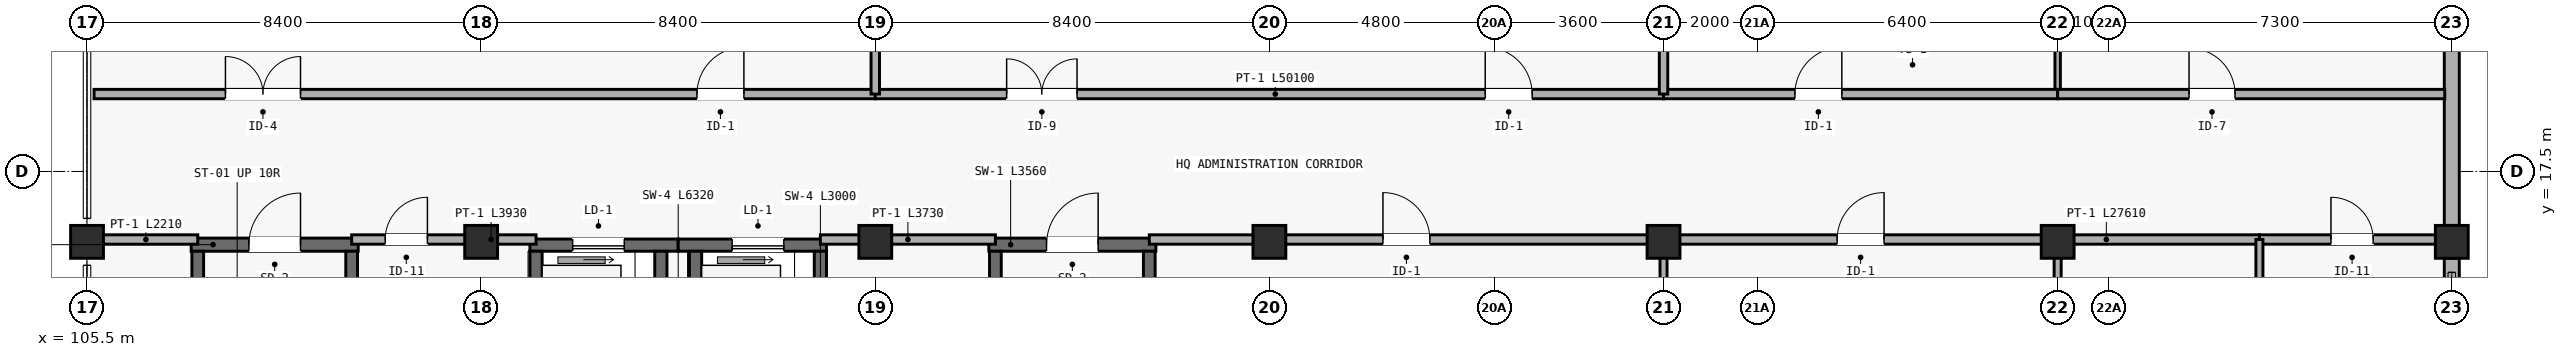
"""IFC4 building model, lengths in metres.
Left out: names, types, materials, properties, quantities, classifications, styles, units other than length and angle.
Written with IfcOpenShell. Run it as: python <this file> out.ifc"""

import sys

from ifc_helpers import new_model, si_unit, direction, frame, frame_2d, origin, origin_2d, place, context, subcontext, project, spatial, rectangle, extrude, element, fill, save


model = new_model("IFC4")
c1 = context("Model", 3, precision=1e-05, world=origin(), true_north=direction((0.0, 1.0)))
c2 = subcontext(c1, "Body", "Model", "MODEL_VIEW")
j1 = project(units=[si_unit("LENGTHUNIT", "METRE"), si_unit("PLANEANGLEUNIT", "RADIAN")], contexts=[c1])
p1 = place(None, origin())
s1 = spatial("IfcSite", under=j1, at=p1, CompositionType="ELEMENT")
p2 = place(p1, origin())
s2 = spatial("IfcBuilding", under=s1, at=p2, CompositionType="ELEMENT")
p3 = place(p2, frame((0.0, 0.0, 5.85)))
s3 = spatial("IfcBuildingStorey", under=s2, at=p3, CompositionType="ELEMENT", Elevation=5.85)
for number, where, z_axis, x_axis in (
    (1, (105.5, 16.0, 0.0), (0.0, 0.0, 1.0), (1.0, 0.0, 0.0)),
    (2, (113.9, 16.0, 0.0), (0.0, 0.0, 1.0), (1.0, 0.0, 0.0)),
    (3, (122.3, 16.0, 0.0), (0.0, 0.0, 1.0), (1.0, 0.0, 0.0)),
    (4, (130.7, 16.0, 0.0), (0.0, 0.0, 1.0), (1.0, 0.0, 0.0)),
    (5, (139.1, 16.0, 0.0), (0.0, 0.0, 1.0), (1.0, 0.0, 0.0)),
    (6, (147.5, 16.0, 0.0), (0.0, 0.0, 1.0), (1.0, 0.0, 0.0)),
    (7, (155.9, 16.0, 0.0), (0.0, 0.0, 1.0), (1.0, 0.0, 0.0)),
):
    element("IfcColumn", number, at=place(p3, frame(where, z_axis=z_axis, x_axis=x_axis)), inside=s3, PredefinedType="COLUMN", context=c2, shape_type="SweptSolid", body=[
        extrude(rectangle(XDim=0.7, YDim=0.7, at=origin_2d()), origin(), (0.0, 0.0, 1.0), 3.45),
    ])
p4 = place(p3, frame((155.9, 9.35, 0.0), z_axis=(0.0, 0.0, 1.0), x_axis=(0.0, 1.0, 0.0)))
e8 = element("IfcWall", 8, at=p4, inside=s3, PredefinedType="STANDARD", context=c2, shape_type="SweptSolid", body=[
    extrude(rectangle(XDim=6.3, YDim=0.32, at=frame_2d((3.15, 0.0))), origin(), (0.0, 0.0, 1.0), 2.7),
])
p5 = place(p3, frame((155.9, 16.35, 0.0), z_axis=(0.0, 0.0, 1.0), x_axis=(0.0, 1.0, 0.0)))
e9 = element("IfcWall", 9, at=p5, inside=s3, PredefinedType="STANDARD", context=c2, shape_type="SweptSolid", body=[
    extrude(rectangle(XDim=7.8, YDim=0.32, at=frame_2d((3.9, 0.0))), origin(), (0.0, 0.0, 1.0), 2.7),
])
p6 = place(p5, frame((3.9, 0.0, 0.75)))
e10 = element("IfcOpeningElement", 10, at=p6, cuts=e9, PredefinedType="OPENING", context=c2, shape_type="SweptSolid", body=[
    extrude(rectangle(XDim=1.75, YDim=1.55, at=frame_2d((0.875, 0.775))), frame((0.0, 0.17, 0.0), z_axis=(0.0, -1.0, 0.0), x_axis=(1.0, 0.0, 0.0)), (0.0, 0.0, 1.0), 0.34),
])
p7 = place(p3, frame((107.72, 15.94, 0.0), z_axis=(0.0, 0.0, 1.0), x_axis=(1.0, 0.0, 0.0)))
e11 = element("IfcWall", 11, at=p7, inside=s3, PredefinedType="SHEAR", context=c2, shape_type="SweptSolid", body=[
    extrude(rectangle(XDim=3.56, YDim=0.28, at=frame_2d((1.78, 0.0))), origin(), (0.0, 0.0, 1.0), 3.2),
])
p8 = place(p7, frame((1.23, 0.0, 0.0)))
e12 = element("IfcOpeningElement", 12, at=p8, cuts=e11, PredefinedType="OPENING", context=c2, shape_type="SweptSolid", body=[
    extrude(rectangle(XDim=1.1, YDim=2.15, at=frame_2d((0.55, 1.075))), frame((0.0, 0.15, 0.0), z_axis=(0.0, -1.0, 0.0), x_axis=(1.0, 0.0, 0.0)), (0.0, 0.0, 1.0), 0.3),
])
for number, where, z_axis, x_axis in (
    (13, (107.86, 15.8, 0.0), (0.0, 0.0, 1.0), (0.0, -1.0, 0.0)),
    (14, (111.14, 9.5, 0.0), (0.0, 0.0, 1.0), (0.0, 1.0, 0.0)),
):
    element("IfcWall", number, at=place(p3, frame(where, z_axis=z_axis, x_axis=x_axis)), inside=s3, PredefinedType="SHEAR", context=c2, shape_type="SweptSolid", body=[
        extrude(rectangle(XDim=6.3, YDim=0.25, at=frame_2d((3.15, 0.0))), origin(), (0.0, 0.0, 1.0), 3.2),
    ])
p9 = place(p3, frame((124.72, 15.94, 0.0), z_axis=(0.0, 0.0, 1.0), x_axis=(1.0, 0.0, 0.0)))
e15 = element("IfcWall", 15, at=p9, inside=s3, PredefinedType="SHEAR", context=c2, shape_type="SweptSolid", body=[
    extrude(rectangle(XDim=3.56, YDim=0.28, at=frame_2d((1.78, 0.0))), origin(), (0.0, 0.0, 1.0), 3.2),
])
p10 = place(p9, frame((1.23, 0.0, 0.0)))
e16 = element("IfcOpeningElement", 16, at=p10, cuts=e15, PredefinedType="OPENING", context=c2, shape_type="SweptSolid", body=[
    extrude(rectangle(XDim=1.1, YDim=2.15, at=frame_2d((0.55, 1.075))), frame((0.0, 0.15, 0.0), z_axis=(0.0, -1.0, 0.0), x_axis=(1.0, 0.0, 0.0)), (0.0, 0.0, 1.0), 0.3),
])
for number, where, z_axis, x_axis in (
    (17, (124.86, 15.8, 0.0), (0.0, 0.0, 1.0), (0.0, -1.0, 0.0)),
    (18, (128.14, 9.5, 0.0), (0.0, 0.0, 1.0), (0.0, 1.0, 0.0)),
):
    element("IfcWall", number, at=place(p3, frame(where, z_axis=z_axis, x_axis=x_axis)), inside=s3, PredefinedType="SHEAR", context=c2, shape_type="SweptSolid", body=[
        extrude(rectangle(XDim=6.3, YDim=0.25, at=frame_2d((3.15, 0.0))), origin(), (0.0, 0.0, 1.0), 3.2),
    ])
p11 = place(p3, frame((118.1, 15.93, 0.0), z_axis=(0.0, 0.0, 1.0), x_axis=(-1.0, 0.0, 0.0)))
e19 = element("IfcWall", 19, at=p11, inside=s3, PredefinedType="SHEAR", context=c2, shape_type="SweptSolid", body=[
    extrude(rectangle(XDim=3.16, YDim=0.26, at=frame_2d((1.58, 0.0))), origin(), (0.0, 0.0, 1.0), 3.2),
])
p12 = place(p11, frame((1.15, 0.0, 0.0)))
e20 = element("IfcOpeningElement", 20, at=p12, cuts=e19, PredefinedType="OPENING", context=c2, shape_type="SweptSolid", body=[
    extrude(rectangle(XDim=1.1, YDim=2.15, at=frame_2d((0.55, 1.075))), frame((0.0, 0.14, 0.0), z_axis=(0.0, -1.0, 0.0), x_axis=(1.0, 0.0, 0.0)), (0.0, 0.0, 1.0), 0.28),
])
for number, where, z_axis, x_axis in (
    (21, (115.07, 15.8, 0.0), (0.0, 0.0, 1.0), (0.0, -1.0, 0.0)),
    (22, (117.73, 12.8, 0.0), (0.0, 0.0, 1.0), (0.0, 1.0, 0.0)),
):
    element("IfcWall", number, at=place(p3, frame(where, z_axis=z_axis, x_axis=x_axis)), inside=s3, PredefinedType="SHEAR", context=c2, shape_type="SweptSolid", body=[
        extrude(rectangle(XDim=3.0, YDim=0.26, at=frame_2d((1.5, 0.0))), origin(), (0.0, 0.0, 1.0), 3.2),
    ])
p13 = place(p3, frame((121.26, 15.93, 0.0), z_axis=(0.0, 0.0, 1.0), x_axis=(-1.0, 0.0, 0.0)))
e23 = element("IfcWall", 23, at=p13, inside=s3, PredefinedType="SHEAR", context=c2, shape_type="SweptSolid", body=[
    extrude(rectangle(XDim=3.16, YDim=0.26, at=frame_2d((1.58, 0.0))), origin(), (0.0, 0.0, 1.0), 3.2),
])
p14 = place(p13, frame((0.91, 0.0, 0.0)))
e24 = element("IfcOpeningElement", 24, at=p14, cuts=e23, PredefinedType="OPENING", context=c2, shape_type="SweptSolid", body=[
    extrude(rectangle(XDim=1.1, YDim=2.15, at=frame_2d((0.55, 1.075))), frame((0.0, 0.14, 0.0), z_axis=(0.0, -1.0, 0.0), x_axis=(1.0, 0.0, 0.0)), (0.0, 0.0, 1.0), 0.28),
])
for number, where, z_axis, x_axis in (
    (25, (118.47, 15.8, 0.0), (0.0, 0.0, 1.0), (0.0, -1.0, 0.0)),
    (26, (121.13, 12.8, 0.0), (0.0, 0.0, 1.0), (0.0, 1.0, 0.0)),
):
    element("IfcWall", number, at=place(p3, frame(where, z_axis=z_axis, x_axis=x_axis)), inside=s3, PredefinedType="SHEAR", context=c2, shape_type="SweptSolid", body=[
        extrude(rectangle(XDim=3.0, YDim=0.26, at=frame_2d((1.5, 0.0))), origin(), (0.0, 0.0, 1.0), 3.2),
    ])
p15 = place(p3, frame((105.65, 16.05, 0.0), z_axis=(0.0, 0.0, 1.0), x_axis=(1.0, 0.0, 0.0)))
e27 = element("IfcWall", 27, at=p15, inside=s3, PredefinedType="PARTITIONING", context=c2, shape_type="SweptSolid", body=[
    extrude(rectangle(XDim=2.21, YDim=0.2, at=frame_2d((1.105, 0.0))), origin(), (0.0, 0.0, 1.0), 2.65),
])
p16 = place(p3, frame((111.14, 16.05, 0.0), z_axis=(0.0, 0.0, 1.0), x_axis=(1.0, 0.0, 0.0)))
e28 = element("IfcWall", 28, at=p16, inside=s3, PredefinedType="PARTITIONING", context=c2, shape_type="SweptSolid", body=[
    extrude(rectangle(XDim=3.93, YDim=0.2, at=frame_2d((1.965, 0.0))), origin(), (0.0, 0.0, 1.0), 2.65),
])
p17 = place(p16, frame((0.715, 0.0, 0.0)))
e29 = element("IfcOpeningElement", 29, at=p17, cuts=e28, PredefinedType="OPENING", context=c2, shape_type="SweptSolid", body=[
    extrude(rectangle(XDim=0.9, YDim=2.08, at=frame_2d((0.45, 1.04))), frame((0.0, 0.11, 0.0), z_axis=(0.0, -1.0, 0.0), x_axis=(1.0, 0.0, 0.0)), (0.0, 0.0, 1.0), 0.22),
])
p18 = place(p3, frame((121.13, 16.05, 0.0), z_axis=(0.0, 0.0, 1.0), x_axis=(1.0, 0.0, 0.0)))
e30 = element("IfcWall", 30, at=p18, inside=s3, PredefinedType="PARTITIONING", context=c2, shape_type="SweptSolid", body=[
    extrude(rectangle(XDim=3.73, YDim=0.2, at=frame_2d((1.865, 0.0))), origin(), (0.0, 0.0, 1.0), 2.65),
])
p19 = place(p3, frame((128.14, 16.05, 0.0), z_axis=(0.0, 0.0, 1.0), x_axis=(1.0, 0.0, 0.0)))
e31 = element("IfcWall", 31, at=p19, inside=s3, PredefinedType="PARTITIONING", context=c2, shape_type="SweptSolid", body=[
    extrude(rectangle(XDim=10.96, YDim=0.2, at=frame_2d((5.48, 0.0))), origin(), (0.0, 0.0, 1.0), 2.65),
])
p20 = place(p19, frame((4.98, 0.0, 0.0)))
e32 = element("IfcOpeningElement", 32, at=p20, cuts=e31, PredefinedType="OPENING", context=c2, shape_type="SweptSolid", body=[
    extrude(rectangle(XDim=1.0, YDim=2.12, at=frame_2d((0.5, 1.06))), frame((0.0, 0.11, 0.0), z_axis=(0.0, -1.0, 0.0), x_axis=(1.0, 0.0, 0.0)), (0.0, 0.0, 1.0), 0.22),
])
p21 = place(p3, frame((139.1, 16.05, 0.0), z_axis=(0.0, 0.0, 1.0), x_axis=(1.0, 0.0, 0.0)))
e33 = element("IfcWall", 33, at=p21, inside=s3, PredefinedType="PARTITIONING", context=c2, shape_type="SweptSolid", body=[
    extrude(rectangle(XDim=8.4, YDim=0.2, at=frame_2d((4.2, 0.0))), origin(), (0.0, 0.0, 1.0), 2.65),
])
p22 = place(p21, frame((3.7, 0.0, 0.0)))
e34 = element("IfcOpeningElement", 34, at=p22, cuts=e33, PredefinedType="OPENING", context=c2, shape_type="SweptSolid", body=[
    extrude(rectangle(XDim=1.0, YDim=2.12, at=frame_2d((0.5, 1.06))), frame((0.0, 0.11, 0.0), z_axis=(0.0, -1.0, 0.0), x_axis=(1.0, 0.0, 0.0)), (0.0, 0.0, 1.0), 0.22),
])
p23 = place(p3, frame((147.5, 16.05, 0.0), z_axis=(0.0, 0.0, 1.0), x_axis=(1.0, 0.0, 0.0)))
e35 = element("IfcWall", 35, at=p23, inside=s3, PredefinedType="PARTITIONING", context=c2, shape_type="SweptSolid", body=[
    extrude(rectangle(XDim=4.3, YDim=0.2, at=frame_2d((2.15, 0.0))), origin(), (0.0, 0.0, 1.0), 2.65),
])
p24 = place(p3, frame((151.8, 16.05, 0.0), z_axis=(0.0, 0.0, 1.0), x_axis=(1.0, 0.0, 0.0)))
e36 = element("IfcWall", 36, at=p24, inside=s3, PredefinedType="PARTITIONING", context=c2, shape_type="SweptSolid", body=[
    extrude(rectangle(XDim=3.95, YDim=0.2, at=frame_2d((1.975, 0.0))), origin(), (0.0, 0.0, 1.0), 2.65),
])
p25 = place(p24, frame((1.525, 0.0, 0.0)))
e37 = element("IfcOpeningElement", 37, at=p25, cuts=e36, PredefinedType="OPENING", context=c2, shape_type="SweptSolid", body=[
    extrude(rectangle(XDim=0.9, YDim=2.08, at=frame_2d((0.45, 1.04))), frame((0.0, 0.11, 0.0), z_axis=(0.0, -1.0, 0.0), x_axis=(1.0, 0.0, 0.0)), (0.0, 0.0, 1.0), 0.22),
])
for number, where, z_axis, x_axis in (
    (38, (139.1, 9.15, 0.0), (0.0, 0.0, 1.0), (0.0, 1.0, 0.0)),
    (39, (147.5, 9.15, 0.0), (0.0, 0.0, 1.0), (0.0, 1.0, 0.0)),
    (40, (151.8, 9.15, 0.0), (0.0, 0.0, 1.0), (0.0, 1.0, 0.0)),
):
    element("IfcWall", number, at=place(p3, frame(where, z_axis=z_axis, x_axis=x_axis)), inside=s3, PredefinedType="PARTITIONING", context=c2, shape_type="SweptSolid", body=[
        extrude(rectangle(XDim=6.9, YDim=0.15, at=frame_2d((3.45, 0.0))), origin(), (0.0, 0.0, 1.0), 2.65),
    ])
p26 = place(p3, frame((147.5, 19.15, 0.0), z_axis=(0.0, 0.0, 1.0), x_axis=(0.0, 1.0, 0.0)))
e41 = element("IfcWall", 41, at=p26, inside=s3, PredefinedType="PARTITIONING", context=c2, shape_type="SweptSolid", body=[
    extrude(rectangle(XDim=5.35, YDim=0.115, at=frame_2d((2.675, 0.0))), origin(), (0.0, 0.0, 1.0), 2.65),
])
p27 = place(p3, frame((105.65, 19.15, 0.0), z_axis=(0.0, 0.0, 1.0), x_axis=(1.0, 0.0, 0.0)))
e42 = element("IfcWall", 42, at=p27, inside=s3, PredefinedType="PARTITIONING", context=c2, shape_type="SweptSolid", body=[
    extrude(rectangle(XDim=16.65, YDim=0.2, at=frame_2d((8.325, 0.0))), origin(), (0.0, 0.0, 1.0), 2.65),
])
p28 = place(p27, frame((2.8, 0.0, 0.0)))
e43 = element("IfcOpeningElement", 43, at=p28, cuts=e42, PredefinedType="OPENING", context=c2, shape_type="SweptSolid", body=[
    extrude(rectangle(XDim=1.6, YDim=2.14, at=frame_2d((0.8, 1.07))), frame((0.0, 0.11, 0.0), z_axis=(0.0, -1.0, 0.0), x_axis=(1.0, 0.0, 0.0)), (0.0, 0.0, 1.0), 0.22),
])
p29 = place(p27, frame((12.85, 0.0, 0.0)))
e44 = element("IfcOpeningElement", 44, at=p29, cuts=e42, PredefinedType="OPENING", context=c2, shape_type="SweptSolid", body=[
    extrude(rectangle(XDim=1.0, YDim=2.12, at=frame_2d((0.5, 1.06))), frame((0.0, 0.11, 0.0), z_axis=(0.0, -1.0, 0.0), x_axis=(1.0, 0.0, 0.0)), (0.0, 0.0, 1.0), 0.22),
])
p30 = place(p3, frame((122.3, 19.15, 0.0), z_axis=(0.0, 0.0, 1.0), x_axis=(1.0, 0.0, 0.0)))
e45 = element("IfcWall", 45, at=p30, inside=s3, PredefinedType="PARTITIONING", context=c2, shape_type="SweptSolid", body=[
    extrude(rectangle(XDim=16.8, YDim=0.2, at=frame_2d((8.4, 0.0))), origin(), (0.0, 0.0, 1.0), 2.65),
])
p31 = place(p30, frame((2.8, 0.0, 0.0)))
e46 = element("IfcOpeningElement", 46, at=p31, cuts=e45, PredefinedType="OPENING", context=c2, shape_type="SweptSolid", body=[
    extrude(rectangle(XDim=1.5, YDim=2.15, at=frame_2d((0.75, 1.075))), frame((0.0, 0.11, 0.0), z_axis=(0.0, -1.0, 0.0), x_axis=(1.0, 0.0, 0.0)), (0.0, 0.0, 1.0), 0.22),
])
p32 = place(p30, frame((13.0, 0.0, 0.0)))
e47 = element("IfcOpeningElement", 47, at=p32, cuts=e45, PredefinedType="OPENING", context=c2, shape_type="SweptSolid", body=[
    extrude(rectangle(XDim=1.0, YDim=2.12, at=frame_2d((0.5, 1.06))), frame((0.0, 0.11, 0.0), z_axis=(0.0, -1.0, 0.0), x_axis=(1.0, 0.0, 0.0)), (0.0, 0.0, 1.0), 0.22),
])
p33 = place(p3, frame((139.1, 19.15, 0.0), z_axis=(0.0, 0.0, 1.0), x_axis=(1.0, 0.0, 0.0)))
e48 = element("IfcWall", 48, at=p33, inside=s3, PredefinedType="PARTITIONING", context=c2, shape_type="SweptSolid", body=[
    extrude(rectangle(XDim=8.4, YDim=0.2, at=frame_2d((4.2, 0.0))), origin(), (0.0, 0.0, 1.0), 2.65),
])
p34 = place(p33, frame((2.8, 0.0, 0.0)))
e49 = element("IfcOpeningElement", 49, at=p34, cuts=e48, PredefinedType="OPENING", context=c2, shape_type="SweptSolid", body=[
    extrude(rectangle(XDim=1.0, YDim=2.12, at=frame_2d((0.5, 1.06))), frame((0.0, 0.11, 0.0), z_axis=(0.0, -1.0, 0.0), x_axis=(1.0, 0.0, 0.0)), (0.0, 0.0, 1.0), 0.22),
])
p35 = place(p3, frame((147.5, 19.15, 0.0), z_axis=(0.0, 0.0, 1.0), x_axis=(1.0, 0.0, 0.0)))
e50 = element("IfcWall", 50, at=p35, inside=s3, PredefinedType="PARTITIONING", context=c2, shape_type="SweptSolid", body=[
    extrude(rectangle(XDim=8.25, YDim=0.2, at=frame_2d((4.125, 0.0))), origin(), (0.0, 0.0, 1.0), 2.65),
])
p36 = place(p35, frame((2.8, 0.0, 0.0)))
e51 = element("IfcOpeningElement", 51, at=p36, cuts=e50, PredefinedType="OPENING", context=c2, shape_type="SweptSolid", body=[
    extrude(rectangle(XDim=0.98, YDim=2.12, at=frame_2d((0.49, 1.06))), frame((0.0, 0.11, 0.0), z_axis=(0.0, -1.0, 0.0), x_axis=(1.0, 0.0, 0.0)), (0.0, 0.0, 1.0), 0.22),
])
for number, where, z_axis, x_axis in (
    (52, (122.3, 19.15, 0.0), (0.0, 0.0, 1.0), (0.0, 1.0, 0.0)),
    (53, (139.1, 19.15, 0.0), (0.0, 0.0, 1.0), (0.0, 1.0, 0.0)),
):
    element("IfcWall", number, at=place(p3, frame(where, z_axis=z_axis, x_axis=x_axis)), inside=s3, PredefinedType="PARTITIONING", context=c2, shape_type="SweptSolid", body=[
        extrude(rectangle(XDim=13.7, YDim=0.18, at=frame_2d((6.85, 0.0))), origin(), (0.0, 0.0, 1.0), 2.65),
    ])
p37 = place(p8, origin())
e54 = element("IfcDoor", 54, at=p37, inside=s3, OperationType="SINGLE_SWING_RIGHT", PredefinedType="DOOR", context=c2, shape_type="SweptSolid", body=[
    extrude(rectangle(XDim=1.1, YDim=2.15, at=frame_2d((0.55, 1.075))), frame((0.0, 0.025, 0.0), z_axis=(0.0, -1.0, 0.0), x_axis=(1.0, 0.0, 0.0)), (0.0, 0.0, 1.0), 0.05),
])
fill(e12, e54)
p38 = place(p10, origin())
e55 = element("IfcDoor", 55, at=p38, inside=s3, OperationType="SINGLE_SWING_RIGHT", PredefinedType="DOOR", context=c2, shape_type="SweptSolid", body=[
    extrude(rectangle(XDim=1.1, YDim=2.15, at=frame_2d((0.55, 1.075))), frame((0.0, 0.025, 0.0), z_axis=(0.0, -1.0, 0.0), x_axis=(1.0, 0.0, 0.0)), (0.0, 0.0, 1.0), 0.05),
])
fill(e16, e55)
p39 = place(p12, origin())
e56 = element("IfcDoor", 56, at=p39, inside=s3, OperationType="SLIDING_TO_LEFT", PredefinedType="DOOR", context=c2, shape_type="SweptSolid", body=[
    extrude(rectangle(XDim=1.1, YDim=2.15, at=frame_2d((0.55, 1.075))), frame((0.0, 0.025, 0.0), z_axis=(0.0, -1.0, 0.0), x_axis=(1.0, 0.0, 0.0)), (0.0, 0.0, 1.0), 0.05),
])
fill(e20, e56)
p40 = place(p14, origin())
e57 = element("IfcDoor", 57, at=p40, inside=s3, OperationType="SLIDING_TO_LEFT", PredefinedType="DOOR", context=c2, shape_type="SweptSolid", body=[
    extrude(rectangle(XDim=1.1, YDim=2.15, at=frame_2d((0.55, 1.075))), frame((0.0, 0.025, 0.0), z_axis=(0.0, -1.0, 0.0), x_axis=(1.0, 0.0, 0.0)), (0.0, 0.0, 1.0), 0.05),
])
fill(e24, e57)
p41 = place(p17, origin())
e58 = element("IfcDoor", 58, at=p41, inside=s3, OperationType="SINGLE_SWING_RIGHT", PredefinedType="DOOR", context=c2, shape_type="SweptSolid", body=[
    extrude(rectangle(XDim=0.9, YDim=2.08, at=frame_2d((0.45, 1.04))), frame((0.0, 0.025, 0.0), z_axis=(0.0, -1.0, 0.0), x_axis=(1.0, 0.0, 0.0)), (0.0, 0.0, 1.0), 0.05),
])
fill(e29, e58)
p42 = place(p20, origin())
e59 = element("IfcDoor", 59, at=p42, inside=s3, OperationType="SINGLE_SWING_LEFT", PredefinedType="DOOR", context=c2, shape_type="SweptSolid", body=[
    extrude(rectangle(XDim=1.0, YDim=2.12, at=frame_2d((0.5, 1.06))), frame((0.0, 0.025, 0.0), z_axis=(0.0, -1.0, 0.0), x_axis=(1.0, 0.0, 0.0)), (0.0, 0.0, 1.0), 0.05),
])
fill(e32, e59)
p43 = place(p22, origin())
e60 = element("IfcDoor", 60, at=p43, inside=s3, OperationType="SINGLE_SWING_RIGHT", PredefinedType="DOOR", context=c2, shape_type="SweptSolid", body=[
    extrude(rectangle(XDim=1.0, YDim=2.12, at=frame_2d((0.5, 1.06))), frame((0.0, 0.025, 0.0), z_axis=(0.0, -1.0, 0.0), x_axis=(1.0, 0.0, 0.0)), (0.0, 0.0, 1.0), 0.05),
])
fill(e34, e60)
p44 = place(p25, origin())
e61 = element("IfcDoor", 61, at=p44, inside=s3, OperationType="SINGLE_SWING_LEFT", PredefinedType="DOOR", context=c2, shape_type="SweptSolid", body=[
    extrude(rectangle(XDim=0.9, YDim=2.08, at=frame_2d((0.45, 1.04))), frame((0.0, 0.025, 0.0), z_axis=(0.0, -1.0, 0.0), x_axis=(1.0, 0.0, 0.0)), (0.0, 0.0, 1.0), 0.05),
])
fill(e37, e61)
p45 = place(p28, origin())
e62 = element("IfcDoor", 62, at=p45, inside=s3, OperationType="DOUBLE_DOOR_SINGLE_SWING", PredefinedType="DOOR", context=c2, shape_type="SweptSolid", body=[
    extrude(rectangle(XDim=1.6, YDim=2.14, at=frame_2d((0.8, 1.07))), frame((0.0, 0.025, 0.0), z_axis=(0.0, -1.0, 0.0), x_axis=(1.0, 0.0, 0.0)), (0.0, 0.0, 1.0), 0.05),
])
fill(e43, e62)
p46 = place(p29, origin())
e63 = element("IfcDoor", 63, at=p46, inside=s3, OperationType="SINGLE_SWING_RIGHT", PredefinedType="DOOR", context=c2, shape_type="SweptSolid", body=[
    extrude(rectangle(XDim=1.0, YDim=2.12, at=frame_2d((0.5, 1.06))), frame((0.0, 0.025, 0.0), z_axis=(0.0, -1.0, 0.0), x_axis=(1.0, 0.0, 0.0)), (0.0, 0.0, 1.0), 0.05),
])
fill(e44, e63)
p47 = place(p31, origin())
e64 = element("IfcDoor", 64, at=p47, inside=s3, OperationType="DOUBLE_DOOR_SINGLE_SWING", PredefinedType="DOOR", context=c2, shape_type="SweptSolid", body=[
    extrude(rectangle(XDim=1.5, YDim=2.15, at=frame_2d((0.75, 1.075))), frame((0.0, 0.025, 0.0), z_axis=(0.0, -1.0, 0.0), x_axis=(1.0, 0.0, 0.0)), (0.0, 0.0, 1.0), 0.05),
])
fill(e46, e64)
p48 = place(p32, origin())
e65 = element("IfcDoor", 65, at=p48, inside=s3, OperationType="SINGLE_SWING_LEFT", PredefinedType="DOOR", context=c2, shape_type="SweptSolid", body=[
    extrude(rectangle(XDim=1.0, YDim=2.12, at=frame_2d((0.5, 1.06))), frame((0.0, 0.025, 0.0), z_axis=(0.0, -1.0, 0.0), x_axis=(1.0, 0.0, 0.0)), (0.0, 0.0, 1.0), 0.05),
])
fill(e47, e65)
p49 = place(p34, origin())
e66 = element("IfcDoor", 66, at=p49, inside=s3, OperationType="SINGLE_SWING_RIGHT", PredefinedType="DOOR", context=c2, shape_type="SweptSolid", body=[
    extrude(rectangle(XDim=1.0, YDim=2.12, at=frame_2d((0.5, 1.06))), frame((0.0, 0.025, 0.0), z_axis=(0.0, -1.0, 0.0), x_axis=(1.0, 0.0, 0.0)), (0.0, 0.0, 1.0), 0.05),
])
fill(e49, e66)
p50 = place(p36, origin())
e67 = element("IfcDoor", 67, at=p50, inside=s3, OperationType="SINGLE_SWING_LEFT", PredefinedType="DOOR", context=c2, shape_type="SweptSolid", body=[
    extrude(rectangle(XDim=0.98, YDim=2.12, at=frame_2d((0.49, 1.06))), frame((0.0, 0.025, 0.0), z_axis=(0.0, -1.0, 0.0), x_axis=(1.0, 0.0, 0.0)), (0.0, 0.0, 1.0), 0.05),
])
fill(e51, e67)
save(model, sys.argv[1])
